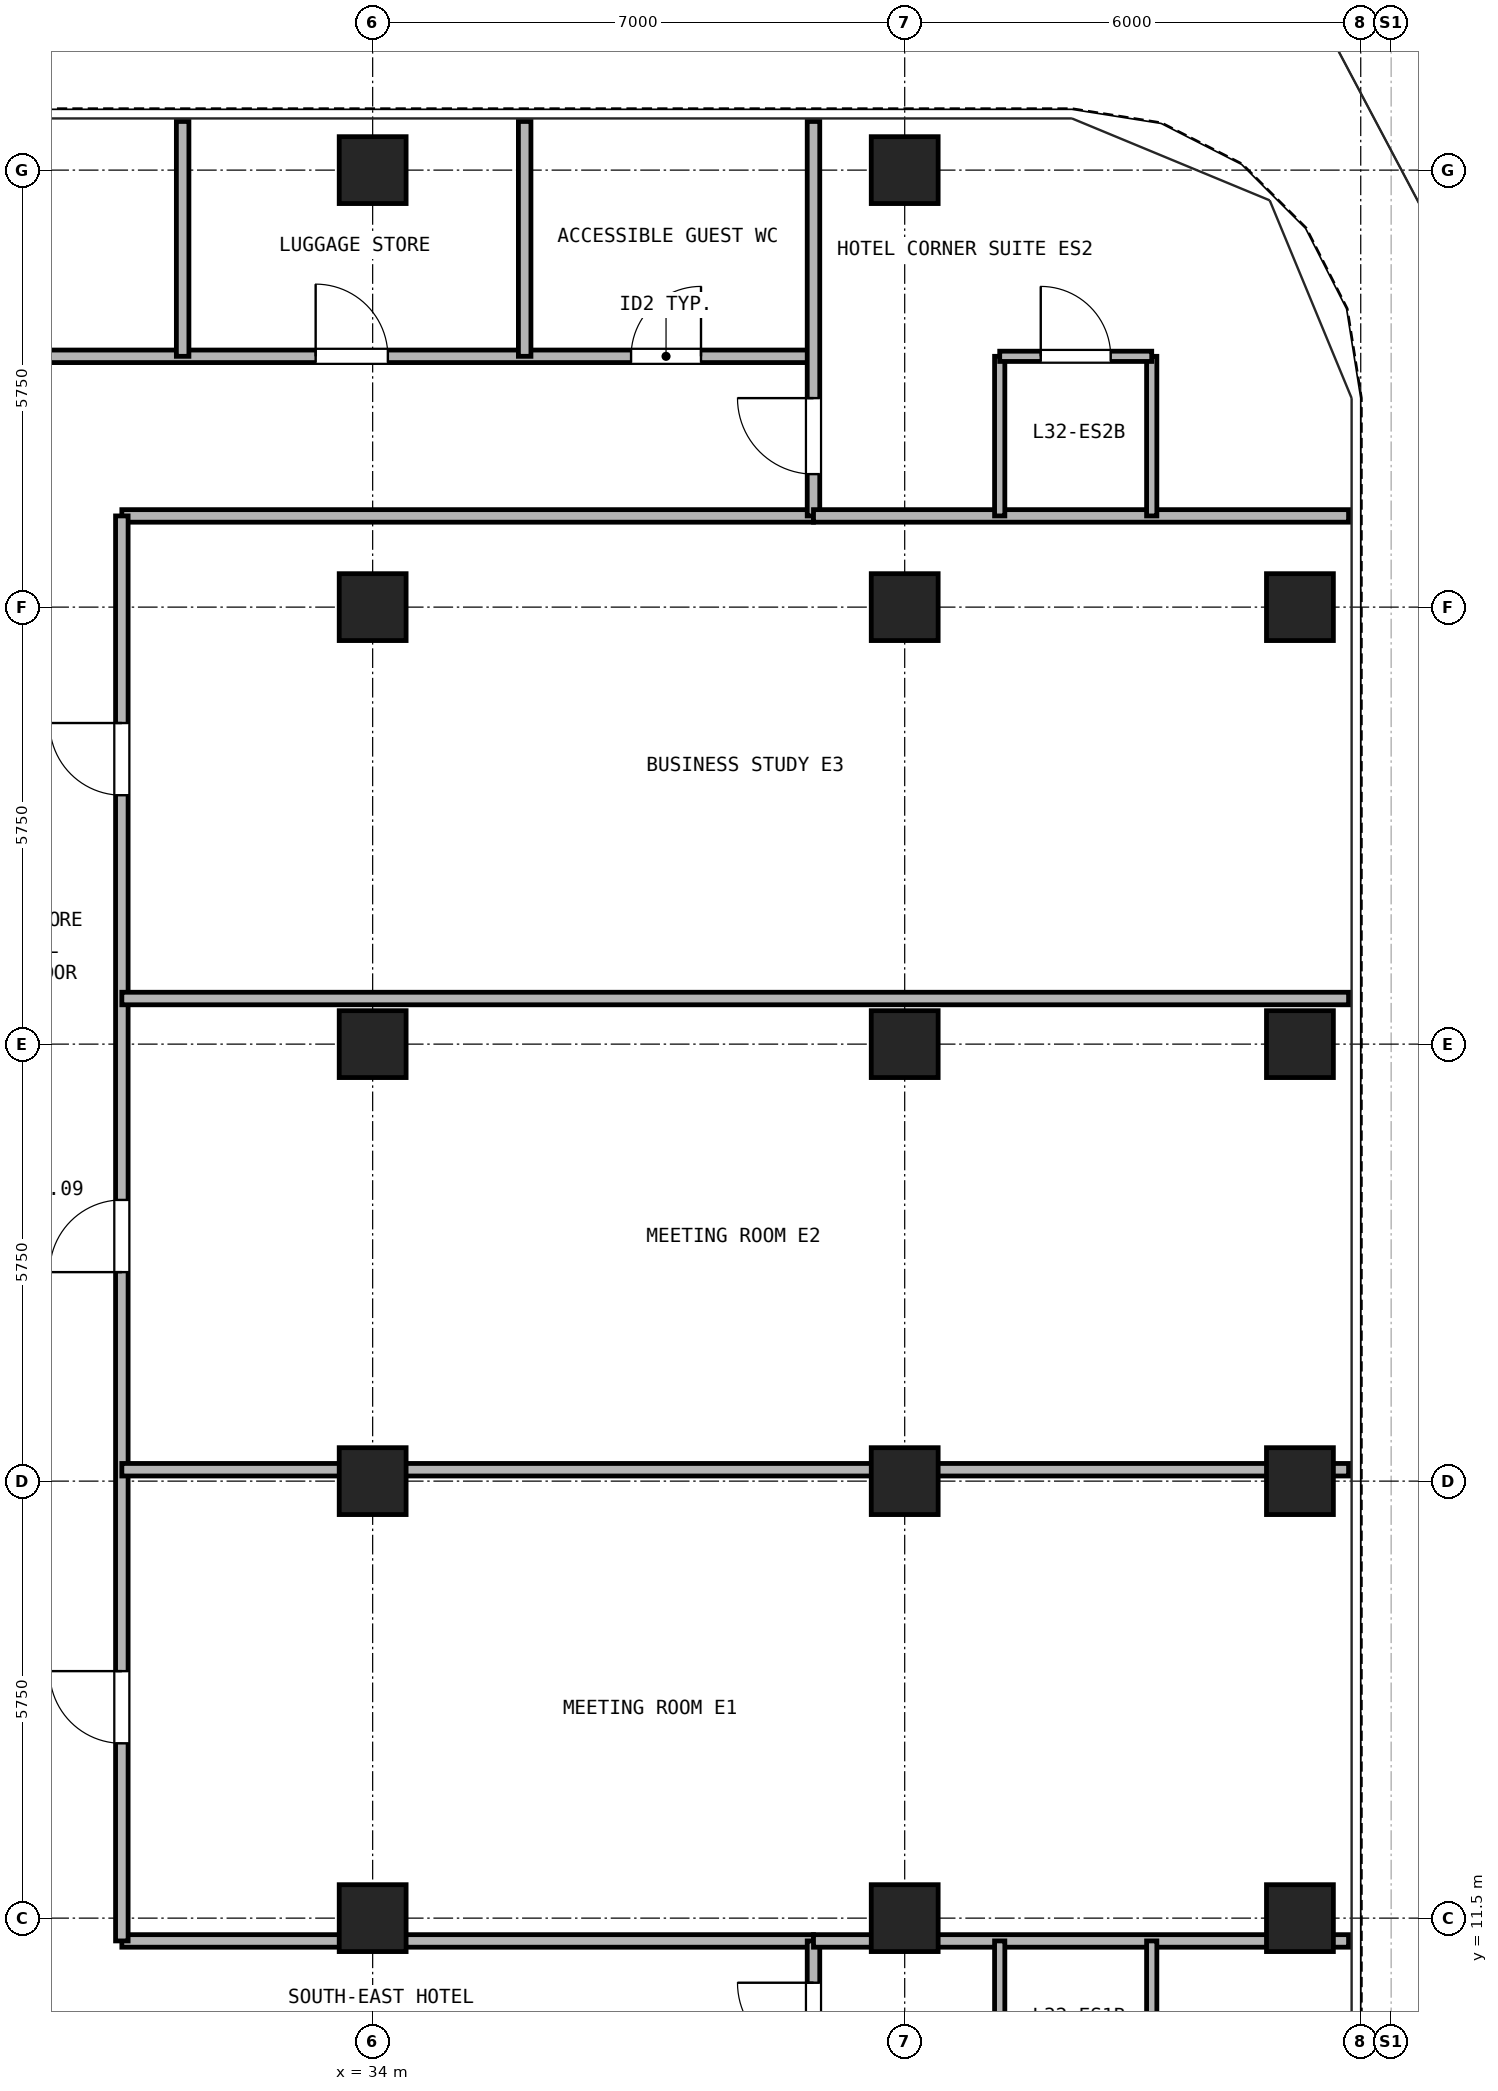
"""IFC4 building model, lengths in metres.
Left out: names, types, materials, properties, quantities, classifications, styles, units other than length and angle.
Written with IfcOpenShell. Run it as: python <this file> out.ifc"""

import sys

from ifc_helpers import new_model, si_unit, direction, frame, frame_2d, origin, origin_2d, place, context, subcontext, project, spatial, rectangle, hollow_rectangle, extrude, source, transform, mapped, element, fill, save


model = new_model("IFC4")
c1 = context("Model", 3, precision=1e-05, world=origin(), true_north=direction((0.0, 1.0)))
c2 = subcontext(c1, "Body", "Model", "MODEL_VIEW")
j1 = project(units=[si_unit("LENGTHUNIT", "METRE"), si_unit("PLANEANGLEUNIT", "RADIAN")], contexts=[c1])
p1 = place(None, origin())
s1 = spatial("IfcSite", under=j1, at=p1, CompositionType="ELEMENT")
p2 = place(p1, origin())
s2 = spatial("IfcBuilding", under=s1, at=p2, CompositionType="ELEMENT")
p3 = place(p2, frame((0.0, 0.0, 118.3)))
s3 = spatial("IfcBuildingStorey", under=s2, at=p3, CompositionType="ELEMENT", Elevation=118.3)
m1 = source(origin(), c2, "Body", "SweptSolid", [
    extrude(hollow_rectangle(XDim=0.88, YDim=0.88, WallThickness=0.05, at=origin_2d()), origin(), (0.0, 0.0, 1.0), 2.95),
])
for number, where, z_axis, x_axis in (
    (1, (34.0, 34.5, 0.0), (0.0, 0.0, 1.0), (1.0, 0.0, 0.0)),
    (2, (41.0, 34.5, 0.0), (0.0, 0.0, 1.0), (1.0, 0.0, 0.0)),
    (3, (46.2, 11.5, 0.0), (0.0, 0.0, 1.0), (1.0, 0.0, 0.0)),
    (4, (46.2, 17.25, 0.0), (0.0, 0.0, 1.0), (1.0, 0.0, 0.0)),
    (5, (46.2, 23.0, 0.0), (0.0, 0.0, 1.0), (1.0, 0.0, 0.0)),
    (6, (46.2, 28.75, 0.0), (0.0, 0.0, 1.0), (1.0, 0.0, 0.0)),
    (7, (34.0, 11.5, 0.0), (0.0, 0.0, 1.0), (1.0, 0.0, 0.0)),
    (8, (34.0, 17.25, 0.0), (0.0, 0.0, 1.0), (1.0, 0.0, 0.0)),
    (9, (34.0, 23.0, 0.0), (0.0, 0.0, 1.0), (1.0, 0.0, 0.0)),
    (10, (34.0, 28.75, 0.0), (0.0, 0.0, 1.0), (1.0, 0.0, 0.0)),
    (11, (41.0, 11.5, 0.0), (0.0, 0.0, 1.0), (1.0, 0.0, 0.0)),
    (12, (41.0, 17.25, 0.0), (0.0, 0.0, 1.0), (1.0, 0.0, 0.0)),
    (13, (41.0, 23.0, 0.0), (0.0, 0.0, 1.0), (1.0, 0.0, 0.0)),
    (14, (41.0, 28.75, 0.0), (0.0, 0.0, 1.0), (1.0, 0.0, 0.0)),
):
    element("IfcColumn", number, at=place(p3, frame(where, z_axis=z_axis, x_axis=x_axis)), inside=s3, PredefinedType="COLUMN", context=c2, shape_type="MappedRepresentation", body=[
        mapped(m1, transform((0.0, 0.0, 0.0), x_axis=(1.0, 0.0, 0.0), y_axis=(0.0, 1.0, 0.0), z_axis=(0.0, 0.0, 1.0), scale=1.0)),
    ])
p4 = place(p3, frame((7.2, 32.05, 0.0), z_axis=(0.0, 0.0, 1.0), x_axis=(1.0, 0.0, 0.0)))
e15 = element("IfcWall", 15, at=p4, inside=s3, PredefinedType="PARTITIONING", context=c2, shape_type="SweptSolid", body=[
    extrude(rectangle(XDim=32.6, YDim=0.165, at=frame_2d((16.3, 0.0))), origin(), (0.0, 0.0, 1.0), 2.95),
])
p5 = place(p4, frame((6.15, 0.0, 0.0)))
e16 = element("IfcOpeningElement", 16, at=p5, cuts=e15, PredefinedType="OPENING", context=c2, shape_type="SweptSolid", body=[
    extrude(rectangle(XDim=0.95, YDim=2.15, at=frame_2d((0.475, 1.075))), frame((0.0, 0.093, 0.0), z_axis=(0.0, -1.0, 0.0), x_axis=(1.0, 0.0, 0.0)), (0.0, 0.0, 1.0), 0.185),
])
p6 = place(p4, frame((18.3, 0.0, 0.0)))
e17 = element("IfcOpeningElement", 17, at=p6, cuts=e15, PredefinedType="OPENING", context=c2, shape_type="SweptSolid", body=[
    extrude(rectangle(XDim=0.95, YDim=2.15, at=frame_2d((0.475, 1.075))), frame((0.0, 0.093, 0.0), z_axis=(0.0, -1.0, 0.0), x_axis=(1.0, 0.0, 0.0)), (0.0, 0.0, 1.0), 0.185),
])
p7 = place(p4, frame((26.05, 0.0, 0.0)))
e18 = element("IfcOpeningElement", 18, at=p7, cuts=e15, PredefinedType="OPENING", context=c2, shape_type="SweptSolid", body=[
    extrude(rectangle(XDim=0.95, YDim=2.15, at=frame_2d((0.475, 1.075))), frame((0.0, 0.093, 0.0), z_axis=(0.0, -1.0, 0.0), x_axis=(1.0, 0.0, 0.0)), (0.0, 0.0, 1.0), 0.185),
])
p8 = place(p4, frame((30.2, 0.0, 0.0)))
e19 = element("IfcOpeningElement", 19, at=p8, cuts=e15, PredefinedType="OPENING", context=c2, shape_type="SweptSolid", body=[
    extrude(rectangle(XDim=0.92, YDim=2.1, at=frame_2d((0.46, 1.05))), frame((0.0, 0.093, 0.0), z_axis=(0.0, -1.0, 0.0), x_axis=(1.0, 0.0, 0.0)), (0.0, 0.0, 1.0), 0.185),
])
for number, where, z_axis, x_axis in (
    (20, (30.7, 11.2, 0.0), (0.0, 0.0, 1.0), (1.0, 0.0, 0.0)),
    (21, (30.7, 29.95, 0.0), (0.0, 0.0, 1.0), (1.0, 0.0, 0.0)),
):
    element("IfcWall", number, at=place(p3, frame(where, z_axis=z_axis, x_axis=x_axis)), inside=s3, PredefinedType="PARTITIONING", context=c2, shape_type="SweptSolid", body=[
        extrude(rectangle(XDim=9.1, YDim=0.165, at=frame_2d((4.55, 0.0))), origin(), (0.0, 0.0, 1.0), 2.95),
    ])
p9 = place(p3, frame((30.7, 11.2, 0.0), z_axis=(0.0, 0.0, 1.0), x_axis=(0.0, 1.0, 0.0)))
e22 = element("IfcWall", 22, at=p9, inside=s3, PredefinedType="PARTITIONING", context=c2, shape_type="SweptSolid", body=[
    extrude(rectangle(XDim=18.75, YDim=0.165, at=frame_2d((9.375, 0.0))), origin(), (0.0, 0.0, 1.0), 2.95),
])
p10 = place(p9, frame((2.6, 0.0, 0.0)))
e23 = element("IfcOpeningElement", 23, at=p10, cuts=e22, PredefinedType="OPENING", context=c2, shape_type="SweptSolid", body=[
    extrude(rectangle(XDim=0.95, YDim=2.15, at=frame_2d((0.475, 1.075))), frame((0.0, 0.093, 0.0), z_axis=(0.0, -1.0, 0.0), x_axis=(1.0, 0.0, 0.0)), (0.0, 0.0, 1.0), 0.185),
])
p11 = place(p9, frame((8.8, 0.0, 0.0)))
e24 = element("IfcOpeningElement", 24, at=p11, cuts=e22, PredefinedType="OPENING", context=c2, shape_type="SweptSolid", body=[
    extrude(rectangle(XDim=0.95, YDim=2.15, at=frame_2d((0.475, 1.075))), frame((0.0, 0.093, 0.0), z_axis=(0.0, -1.0, 0.0), x_axis=(1.0, 0.0, 0.0)), (0.0, 0.0, 1.0), 0.185),
])
p12 = place(p9, frame((15.075, 0.0, 0.0)))
e25 = element("IfcOpeningElement", 25, at=p12, cuts=e22, PredefinedType="OPENING", context=c2, shape_type="SweptSolid", body=[
    extrude(rectangle(XDim=0.95, YDim=2.15, at=frame_2d((0.475, 1.075))), frame((0.0, 0.093, 0.0), z_axis=(0.0, -1.0, 0.0), x_axis=(1.0, 0.0, 0.0)), (0.0, 0.0, 1.0), 0.185),
])
p13 = place(p3, frame((39.8, 0.16, 0.0), z_axis=(0.0, 0.0, 1.0), x_axis=(0.0, 1.0, 0.0)))
e26 = element("IfcWall", 26, at=p13, inside=s3, PredefinedType="PARTITIONING", context=c2, shape_type="SweptSolid", body=[
    extrude(rectangle(XDim=11.04, YDim=0.165, at=frame_2d((5.52, 0.0))), origin(), (0.0, 0.0, 1.0), 2.95),
])
p14 = place(p13, frame((9.49, 0.0, 0.0)))
e27 = element("IfcOpeningElement", 27, at=p14, cuts=e26, PredefinedType="OPENING", context=c2, shape_type="SweptSolid", body=[
    extrude(rectangle(XDim=1.0, YDim=2.15, at=frame_2d((0.5, 1.075))), frame((0.0, 0.093, 0.0), z_axis=(0.0, -1.0, 0.0), x_axis=(1.0, 0.0, 0.0)), (0.0, 0.0, 1.0), 0.185),
])
p15 = place(p3, frame((39.8, 29.95, 0.0), z_axis=(0.0, 0.0, 1.0), x_axis=(0.0, 1.0, 0.0)))
e28 = element("IfcWall", 28, at=p15, inside=s3, PredefinedType="PARTITIONING", context=c2, shape_type="SweptSolid", body=[
    extrude(rectangle(XDim=5.19, YDim=0.165, at=frame_2d((2.595, 0.0))), origin(), (0.0, 0.0, 1.0), 2.95),
])
p16 = place(p15, frame((0.55, 0.0, 0.0)))
e29 = element("IfcOpeningElement", 29, at=p16, cuts=e28, PredefinedType="OPENING", context=c2, shape_type="SweptSolid", body=[
    extrude(rectangle(XDim=1.0, YDim=2.15, at=frame_2d((0.5, 1.075))), frame((0.0, 0.093, 0.0), z_axis=(0.0, -1.0, 0.0), x_axis=(1.0, 0.0, 0.0)), (0.0, 0.0, 1.0), 0.185),
])
for number, where, z_axis, x_axis in (
    (30, (39.8, 11.2, 0.0), (0.0, 0.0, 1.0), (1.0, 0.0, 0.0)),
    (31, (39.8, 29.95, 0.0), (0.0, 0.0, 1.0), (1.0, 0.0, 0.0)),
):
    element("IfcWall", number, at=place(p3, frame(where, z_axis=z_axis, x_axis=x_axis)), inside=s3, PredefinedType="PARTITIONING", context=c2, shape_type="SweptSolid", body=[
        extrude(rectangle(XDim=7.04, YDim=0.165, at=frame_2d((3.52, 0.0))), origin(), (0.0, 0.0, 1.0), 2.95),
    ])
for number, where, z_axis, x_axis in (
    (32, (42.25, 9.1, 0.0), (0.0, 0.0, 1.0), (0.0, 1.0, 0.0)),
    (33, (44.25, 9.1, 0.0), (0.0, 0.0, 1.0), (0.0, 1.0, 0.0)),
):
    element("IfcWall", number, at=place(p3, frame(where, z_axis=z_axis, x_axis=x_axis)), inside=s3, PredefinedType="PARTITIONING", context=c2, shape_type="SweptSolid", body=[
        extrude(rectangle(XDim=2.1, YDim=0.135, at=frame_2d((1.05, 0.0))), origin(), (0.0, 0.0, 1.0), 2.95),
    ])
for number, where, z_axis, x_axis in (
    (34, (42.25, 29.95, 0.0), (0.0, 0.0, 1.0), (0.0, 1.0, 0.0)),
    (35, (44.25, 29.95, 0.0), (0.0, 0.0, 1.0), (0.0, 1.0, 0.0)),
):
    element("IfcWall", number, at=place(p3, frame(where, z_axis=z_axis, x_axis=x_axis)), inside=s3, PredefinedType="PARTITIONING", context=c2, shape_type="SweptSolid", body=[
        extrude(rectangle(XDim=2.1, YDim=0.135, at=frame_2d((1.05, 0.0))), origin(), (0.0, 0.0, 1.0), 2.95),
    ])
p17 = place(p3, frame((42.25, 32.05, 0.0), z_axis=(0.0, 0.0, 1.0), x_axis=(1.0, 0.0, 0.0)))
e36 = element("IfcWall", 36, at=p17, inside=s3, PredefinedType="PARTITIONING", context=c2, shape_type="SweptSolid", body=[
    extrude(rectangle(XDim=2.0, YDim=0.135, at=frame_2d((1.0, 0.0))), origin(), (0.0, 0.0, 1.0), 2.95),
])
p18 = place(p17, frame((0.54, 0.0, 0.0)))
e37 = element("IfcOpeningElement", 37, at=p18, cuts=e36, PredefinedType="OPENING", context=c2, shape_type="SweptSolid", body=[
    extrude(rectangle(XDim=0.92, YDim=2.1, at=frame_2d((0.46, 1.05))), frame((0.0, 0.077, 0.0), z_axis=(0.0, -1.0, 0.0), x_axis=(1.0, 0.0, 0.0)), (0.0, 0.0, 1.0), 0.155),
])
for number, where, z_axis, x_axis in (
    (38, (31.5, 32.05, 0.0), (0.0, 0.0, 1.0), (0.0, 1.0, 0.0)),
    (39, (36.0, 32.05, 0.0), (0.0, 0.0, 1.0), (0.0, 1.0, 0.0)),
):
    element("IfcWall", number, at=place(p3, frame(where, z_axis=z_axis, x_axis=x_axis)), inside=s3, PredefinedType="PARTITIONING", context=c2, shape_type="SweptSolid", body=[
        extrude(rectangle(XDim=3.09, YDim=0.165, at=frame_2d((1.545, 0.0))), origin(), (0.0, 0.0, 1.0), 2.95),
    ])
p19 = place(p3, frame((30.7, 17.4, 0.0), z_axis=(0.0, 0.0, 1.0), x_axis=(1.0, 0.0, 0.0)))
e40 = element("IfcWall", 40, at=p19, inside=s3, PredefinedType="PARTITIONING", context=c2, shape_type="SweptSolid", body=[
    extrude(rectangle(XDim=16.14, YDim=0.165, at=frame_2d((8.07, 0.0))), origin(), (0.0, 0.0, 1.0), 2.247),
])
p20 = place(p3, frame((30.7, 23.6, 0.0), z_axis=(0.0, 0.0, 1.0), x_axis=(1.0, 0.0, 0.0)))
e41 = element("IfcWall", 41, at=p20, inside=s3, PredefinedType="PARTITIONING", context=c2, shape_type="SweptSolid", body=[
    extrude(rectangle(XDim=16.14, YDim=0.165, at=frame_2d((8.07, 0.0))), origin(), (0.0, 0.0, 1.0), 2.95),
])
p21 = place(p14, frame((1.0, 0.0, 0.0), z_axis=(0.0, 0.0, 1.0), x_axis=(-1.0, 0.0, 0.0)))
e42 = element("IfcDoor", 42, at=p21, inside=s3, OperationType="SINGLE_SWING_RIGHT", PredefinedType="DOOR", context=c2, shape_type="SweptSolid", body=[
    extrude(rectangle(XDim=1.0, YDim=2.15, at=frame_2d((0.5, 1.075))), frame((0.0, 0.025, 0.0), z_axis=(0.0, -1.0, 0.0), x_axis=(1.0, 0.0, 0.0)), (0.0, 0.0, 1.0), 0.05),
])
fill(e27, e42)
p22 = place(p18, frame((0.92, 0.0, 0.0), z_axis=(0.0, 0.0, 1.0), x_axis=(-1.0, 0.0, 0.0)))
e43 = element("IfcDoor", 43, at=p22, inside=s3, OperationType="SINGLE_SWING_LEFT", PredefinedType="DOOR", context=c2, shape_type="SweptSolid", body=[
    extrude(rectangle(XDim=0.92, YDim=2.1, at=frame_2d((0.46, 1.05))), frame((0.0, 0.025, 0.0), z_axis=(0.0, -1.0, 0.0), x_axis=(1.0, 0.0, 0.0)), (0.0, 0.0, 1.0), 0.05),
])
fill(e37, e43)
p23 = place(p16, frame((1.0, 0.0, 0.0), z_axis=(0.0, 0.0, 1.0), x_axis=(-1.0, 0.0, 0.0)))
e44 = element("IfcDoor", 44, at=p23, inside=s3, OperationType="SINGLE_SWING_RIGHT", PredefinedType="DOOR", context=c2, shape_type="SweptSolid", body=[
    extrude(rectangle(XDim=1.0, YDim=2.15, at=frame_2d((0.5, 1.075))), frame((0.0, 0.025, 0.0), z_axis=(0.0, -1.0, 0.0), x_axis=(1.0, 0.0, 0.0)), (0.0, 0.0, 1.0), 0.05),
])
fill(e29, e44)
p24 = place(p7, origin())
e45 = element("IfcDoor", 45, at=p24, inside=s3, OperationType="SINGLE_SWING_LEFT", PredefinedType="DOOR", context=c2, shape_type="SweptSolid", body=[
    extrude(rectangle(XDim=0.95, YDim=2.15, at=frame_2d((0.475, 1.075))), frame((0.0, 0.025, 0.0), z_axis=(0.0, -1.0, 0.0), x_axis=(1.0, 0.0, 0.0)), (0.0, 0.0, 1.0), 0.05),
])
fill(e18, e45)
p25 = place(p8, origin())
e46 = element("IfcDoor", 46, at=p25, inside=s3, OperationType="SINGLE_SWING_RIGHT", PredefinedType="DOOR", context=c2, shape_type="SweptSolid", body=[
    extrude(rectangle(XDim=0.92, YDim=2.1, at=frame_2d((0.46, 1.05))), frame((0.0, 0.025, 0.0), z_axis=(0.0, -1.0, 0.0), x_axis=(1.0, 0.0, 0.0)), (0.0, 0.0, 1.0), 0.05),
])
fill(e19, e46)
p26 = place(p10, origin())
e47 = element("IfcDoor", 47, at=p26, inside=s3, OperationType="SINGLE_SWING_RIGHT", PredefinedType="DOOR", context=c2, shape_type="SweptSolid", body=[
    extrude(rectangle(XDim=0.95, YDim=2.15, at=frame_2d((0.475, 1.075))), frame((0.0, 0.025, 0.0), z_axis=(0.0, -1.0, 0.0), x_axis=(1.0, 0.0, 0.0)), (0.0, 0.0, 1.0), 0.05),
])
fill(e23, e47)
p27 = place(p11, origin())
e48 = element("IfcDoor", 48, at=p27, inside=s3, OperationType="SINGLE_SWING_LEFT", PredefinedType="DOOR", context=c2, shape_type="SweptSolid", body=[
    extrude(rectangle(XDim=0.95, YDim=2.15, at=frame_2d((0.475, 1.075))), frame((0.0, 0.025, 0.0), z_axis=(0.0, -1.0, 0.0), x_axis=(1.0, 0.0, 0.0)), (0.0, 0.0, 1.0), 0.05),
])
fill(e24, e48)
p28 = place(p12, origin())
e49 = element("IfcDoor", 49, at=p28, inside=s3, OperationType="SINGLE_SWING_RIGHT", PredefinedType="DOOR", context=c2, shape_type="SweptSolid", body=[
    extrude(rectangle(XDim=0.95, YDim=2.15, at=frame_2d((0.475, 1.075))), frame((0.0, 0.025, 0.0), z_axis=(0.0, -1.0, 0.0), x_axis=(1.0, 0.0, 0.0)), (0.0, 0.0, 1.0), 0.05),
])
fill(e25, e49)
save(model, sys.argv[1])
